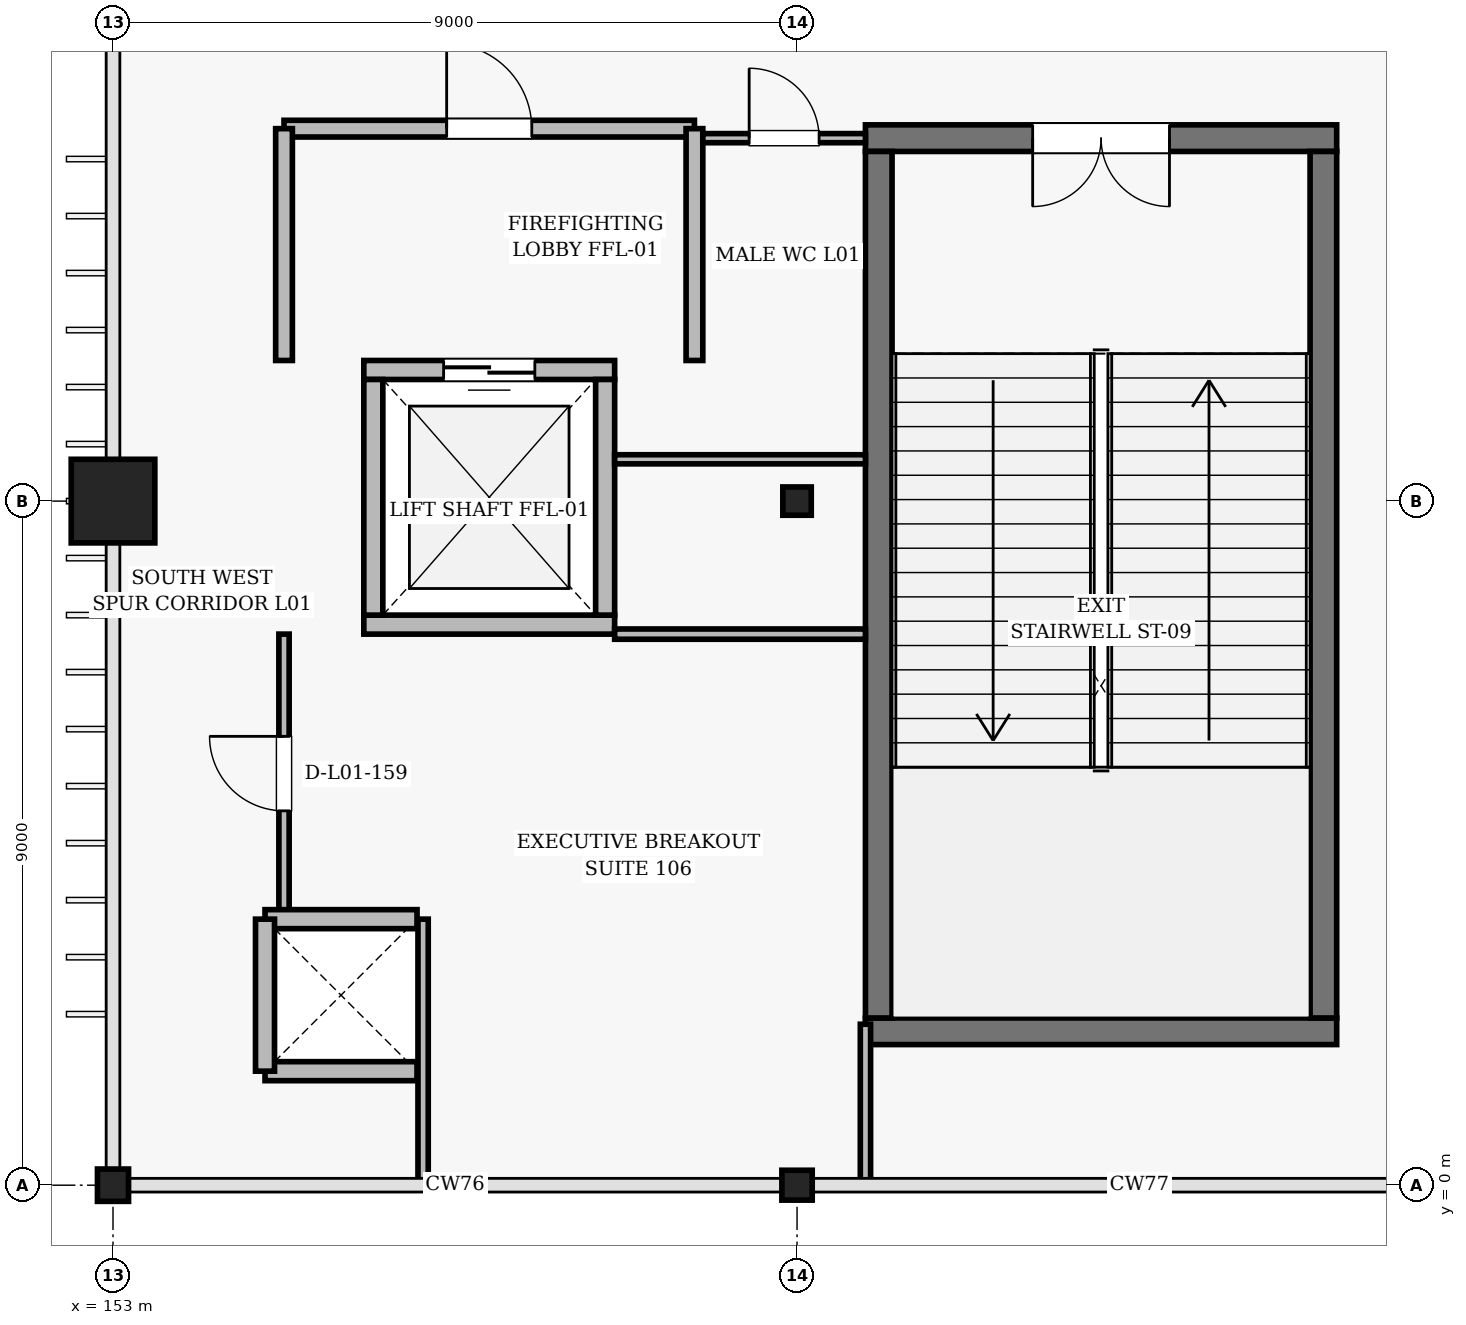
"""IFC4 building model, lengths in metres.
Left out: names, types, materials, properties, quantities, classifications, styles, units other than length and angle.
Written with IfcOpenShell. Run it as: python <this file> out.ifc"""

import sys

from ifc_helpers import new_model, si_unit, direction, frame, frame_2d, origin, origin_2d, place, context, subcontext, project, spatial, rectangle, i_section, extrude, element, fill, save


model = new_model("IFC4")
c1 = context("Model", 3, precision=1e-05, world=origin(), true_north=direction((0.0, 1.0)))
c2 = subcontext(c1, "Body", "Model", "MODEL_VIEW")
j1 = project(units=[si_unit("LENGTHUNIT", "METRE"), si_unit("PLANEANGLEUNIT", "RADIAN")], contexts=[c1])
p1 = place(None, origin())
s1 = spatial("IfcSite", under=j1, at=p1, CompositionType="ELEMENT")
p2 = place(p1, origin())
s2 = spatial("IfcBuilding", under=s1, at=p2, CompositionType="ELEMENT")
p3 = place(p2, frame((0.0, 0.0, 5.4)))
s3 = spatial("IfcBuildingStorey", under=s2, at=p3, CompositionType="ELEMENT", Elevation=5.4)
p4 = place(p3, frame((153.0, 0.0, 0.0), z_axis=(0.0, 0.0, 1.0), x_axis=(1.0, 0.0, 0.0)))
e1 = element("IfcColumn", 1, at=p4, inside=s3, PredefinedType="COLUMN", context=c2, shape_type="SweptSolid", body=[
    extrude(i_section(OverallWidth=0.409, OverallDepth=0.425, WebThickness=0.031, FlangeThickness=0.049, FilletRadius=0.02, at=origin_2d()), origin(), (0.0, 0.0, 1.0), 5.4),
])
p5 = place(p3, frame((153.0, 9.0, 0.0), z_axis=(0.0, 0.0, 1.0), x_axis=(1.0, 0.0, 0.0)))
e2 = element("IfcColumn", 2, at=p5, inside=s3, PredefinedType="COLUMN", context=c2, shape_type="SweptSolid", body=[
    extrude(rectangle(XDim=1.1, YDim=1.1, at=origin_2d()), origin(), (0.0, 0.0, 1.0), 5.4),
])
p6 = place(p3, frame((162.0, 0.0, 0.0), z_axis=(0.0, 0.0, 1.0), x_axis=(1.0, 0.0, 0.0)))
e3 = element("IfcColumn", 3, at=p6, inside=s3, PredefinedType="COLUMN", context=c2, shape_type="SweptSolid", body=[
    extrude(i_section(OverallWidth=0.399, OverallDepth=0.393, WebThickness=0.023, FlangeThickness=0.037, FilletRadius=0.018, at=origin_2d()), origin(), (0.0, 0.0, 1.0), 5.4),
])
p7 = place(p3, frame((162.0, 9.0, 0.0), z_axis=(0.0, 0.0, 1.0), x_axis=(1.0, 0.0, 0.0)))
e4 = element("IfcColumn", 4, at=p7, inside=s3, PredefinedType="COLUMN", context=c2, shape_type="SweptSolid", body=[
    extrude(i_section(OverallWidth=0.374, OverallDepth=0.372, WebThickness=0.016, FlangeThickness=0.026, FilletRadius=0.016, at=origin_2d()), origin(), (0.0, 0.0, 1.0), 5.4),
])
p8 = place(p3, frame((162.9, 2.025, 0.0), z_axis=(0.0, 0.0, 1.0), x_axis=(1.0, 0.0, 0.0)))
e5 = element("IfcWall", 5, at=p8, inside=s3, PredefinedType="SHEAR", context=c2, shape_type="SweptSolid", body=[
    extrude(rectangle(XDim=6.2, YDim=0.35, at=frame_2d((3.1, 0.0))), origin(), (0.0, 0.0, 1.0), 5.18),
])
p9 = place(p3, frame((169.1, 13.775, 0.0), z_axis=(0.0, 0.0, 1.0), x_axis=(-1.0, 0.0, 0.0)))
e6 = element("IfcWall", 6, at=p9, inside=s3, PredefinedType="SHEAR", context=c2, shape_type="SweptSolid", body=[
    extrude(rectangle(XDim=6.2, YDim=0.35, at=frame_2d((3.1, 0.0))), origin(), (0.0, 0.0, 1.0), 5.18),
])
p10 = place(p9, frame((2.2, 0.0, 0.0)))
e7 = element("IfcOpeningElement", 7, at=p10, cuts=e6, PredefinedType="OPENING", context=c2, shape_type="SweptSolid", body=[
    extrude(rectangle(XDim=1.8, YDim=2.2, at=frame_2d((0.9, 1.1))), frame((0.0, 0.185, 0.0), z_axis=(0.0, -1.0, 0.0), x_axis=(1.0, 0.0, 0.0)), (0.0, 0.0, 1.0), 0.37),
])
for number, where, z_axis, x_axis in (
    (8, (163.075, 13.6, 0.0), (0.0, 0.0, 1.0), (0.0, -1.0, 0.0)),
    (9, (168.925, 2.2, 0.0), (0.0, 0.0, 1.0), (0.0, 1.0, 0.0)),
):
    element("IfcWall", number, at=place(p3, frame(where, z_axis=z_axis, x_axis=x_axis)), inside=s3, PredefinedType="SHEAR", context=c2, shape_type="SweptSolid", body=[
        extrude(rectangle(XDim=11.4, YDim=0.35, at=frame_2d((5.7, 0.0))), origin(), (0.0, 0.0, 1.0), 5.18),
    ])
p11 = place(p3, frame((156.3, 7.375, 0.0), z_axis=(0.0, 0.0, 1.0), x_axis=(1.0, 0.0, 0.0)))
e10 = element("IfcWall", 10, at=p11, inside=s3, PredefinedType="SOLIDWALL", context=c2, shape_type="SweptSolid", body=[
    extrude(rectangle(XDim=3.3, YDim=0.25, at=frame_2d((1.65, 0.0))), origin(), (0.0, 0.0, 1.0), 5.16),
])
p12 = place(p3, frame((159.6, 10.725, 0.0), z_axis=(0.0, 0.0, 1.0), x_axis=(-1.0, 0.0, 0.0)))
e11 = element("IfcWall", 11, at=p12, inside=s3, PredefinedType="SOLIDWALL", context=c2, shape_type="SweptSolid", body=[
    extrude(rectangle(XDim=3.3, YDim=0.25, at=frame_2d((1.65, 0.0))), origin(), (0.0, 0.0, 1.0), 5.16),
])
p13 = place(p12, frame((1.05, 0.0, 0.0)))
e12 = element("IfcOpeningElement", 12, at=p13, cuts=e11, PredefinedType="OPENING", context=c2, shape_type="SweptSolid", body=[
    extrude(rectangle(XDim=1.2, YDim=2.25, at=frame_2d((0.6, 1.125))), frame((0.0, 0.135, 0.0), z_axis=(0.0, -1.0, 0.0), x_axis=(1.0, 0.0, 0.0)), (0.0, 0.0, 1.0), 0.27),
])
for number, where, z_axis, x_axis in (
    (13, (156.425, 10.6, 0.0), (0.0, 0.0, 1.0), (0.0, -1.0, 0.0)),
    (14, (159.475, 7.5, 0.0), (0.0, 0.0, 1.0), (0.0, 1.0, 0.0)),
):
    element("IfcWall", number, at=place(p3, frame(where, z_axis=z_axis, x_axis=x_axis)), inside=s3, PredefinedType="SOLIDWALL", context=c2, shape_type="SweptSolid", body=[
        extrude(rectangle(XDim=3.1, YDim=0.25, at=frame_2d((1.55, 0.0))), origin(), (0.0, 0.0, 1.0), 5.16),
    ])
p14 = place(p3, frame((155.25, 13.9, 0.0), z_axis=(0.0, 0.0, 1.0), x_axis=(1.0, 0.0, 0.0)))
e15 = element("IfcWall", 15, at=p14, inside=s3, PredefinedType="SOLIDWALL", context=c2, shape_type="SweptSolid", body=[
    extrude(rectangle(XDim=5.4, YDim=0.22, at=frame_2d((2.7, 0.0))), origin(), (0.0, 0.0, 1.0), 5.16),
])
p15 = place(p14, frame((2.14, 0.0, 0.0)))
e16 = element("IfcOpeningElement", 16, at=p15, cuts=e15, PredefinedType="OPENING", context=c2, shape_type="SweptSolid", body=[
    extrude(rectangle(XDim=1.12, YDim=2.2, at=frame_2d((0.56, 1.1))), frame((0.0, 0.12, 0.0), z_axis=(0.0, -1.0, 0.0), x_axis=(1.0, 0.0, 0.0)), (0.0, 0.0, 1.0), 0.24),
])
for number, where, z_axis, x_axis in (
    (17, (155.25, 10.85, 0.0), (0.0, 0.0, 1.0), (0.0, 1.0, 0.0)),
    (18, (160.65, 10.85, 0.0), (0.0, 0.0, 1.0), (0.0, 1.0, 0.0)),
):
    element("IfcWall", number, at=place(p3, frame(where, z_axis=z_axis, x_axis=x_axis)), inside=s3, PredefinedType="SOLIDWALL", context=c2, shape_type="SweptSolid", body=[
        extrude(rectangle(XDim=3.05, YDim=0.22, at=frame_2d((1.525, 0.0))), origin(), (0.0, 0.0, 1.0), 5.16),
    ])
p16 = place(p3, frame((160.76, 13.775, 0.0), z_axis=(0.0, 0.0, 1.0), x_axis=(1.0, 0.0, 0.0)))
e19 = element("IfcWall", 19, at=p16, inside=s3, PredefinedType="PARTITIONING", context=c2, shape_type="SweptSolid", body=[
    extrude(rectangle(XDim=2.14, YDim=0.12, at=frame_2d((1.07, 0.0))), origin(), (0.0, 0.0, 1.0), 4.47),
])
p17 = place(p16, frame((0.61, 0.0, 0.0)))
e20 = element("IfcOpeningElement", 20, at=p17, cuts=e19, PredefinedType="OPENING", context=c2, shape_type="SweptSolid", body=[
    extrude(rectangle(XDim=0.92, YDim=2.12, at=frame_2d((0.46, 1.06))), frame((0.0, 0.07, 0.0), z_axis=(0.0, -1.0, 0.0), x_axis=(1.0, 0.0, 0.0)), (0.0, 0.0, 1.0), 0.14),
])
p18 = place(p3, frame((162.9, 9.55, 0.0), z_axis=(0.0, 0.0, 1.0), x_axis=(-1.0, 0.0, 0.0)))
e21 = element("IfcWall", 21, at=p18, inside=s3, PredefinedType="PARTITIONING", context=c2, shape_type="SweptSolid", body=[
    extrude(rectangle(XDim=3.3, YDim=0.12, at=frame_2d((1.65, 0.0))), origin(), (0.0, 0.0, 1.0), 4.47),
])
p19 = place(p3, frame((159.6, 7.25, 0.0), z_axis=(0.0, 0.0, 1.0), x_axis=(1.0, 0.0, 0.0)))
e22 = element("IfcWall", 22, at=p19, inside=s3, PredefinedType="PARTITIONING", context=c2, shape_type="SweptSolid", body=[
    extrude(rectangle(XDim=3.3, YDim=0.135, at=frame_2d((1.65, 0.0))), origin(), (0.0, 0.0, 1.0), 4.392),
])
p20 = place(p3, frame((162.9, 2.117, 0.0), z_axis=(0.0, 0.0, 1.0), x_axis=(0.0, -1.0, 0.0)))
e23 = element("IfcWall", 23, at=p20, inside=s3, PredefinedType="PARTITIONING", context=c2, shape_type="SweptSolid", body=[
    extrude(rectangle(XDim=2.105, YDim=0.135, at=frame_2d((1.053, 0.0))), origin(), (0.0, 0.0, 1.0), 4.699),
])
p21 = place(p3, frame((157.08, 0.012, 0.0), z_axis=(0.0, 0.0, 1.0), x_axis=(0.0, 1.0, 0.0)))
e24 = element("IfcWall", 24, at=p21, inside=s3, PredefinedType="PARTITIONING", context=c2, shape_type="SweptSolid", body=[
    extrude(rectangle(XDim=3.488, YDim=0.135, at=frame_2d((1.744, 0.0))), origin(), (0.0, 0.0, 1.0), 4.626),
])
p22 = place(p3, frame((155.25, 3.58, 0.0), z_axis=(0.0, 0.0, 1.0), x_axis=(0.0, 1.0, 0.0)))
e25 = element("IfcWall", 25, at=p22, inside=s3, PredefinedType="PARTITIONING", context=c2, shape_type="SweptSolid", body=[
    extrude(rectangle(XDim=3.67, YDim=0.135, at=frame_2d((1.835, 0.0))), origin(), (0.0, 0.0, 1.0), 5.16),
])
p23 = place(p22, frame((1.345, 0.0, 0.0)))
e26 = element("IfcOpeningElement", 26, at=p23, cuts=e25, PredefinedType="OPENING", context=c2, shape_type="SweptSolid", body=[
    extrude(rectangle(XDim=0.98, YDim=2.15, at=frame_2d((0.49, 1.075))), frame((0.0, 0.078, 0.0), z_axis=(0.0, -1.0, 0.0), x_axis=(1.0, 0.0, 0.0)), (0.0, 0.0, 1.0), 0.155),
])
for number, where, z_axis, x_axis in (
    (27, (155.0, 1.5, 0.0), (0.0, 0.0, 1.0), (1.0, 0.0, 0.0)),
    (28, (157.0, 3.5, 0.0), (0.0, 0.0, 1.0), (-1.0, 0.0, 0.0)),
    (29, (155.0, 3.5, 0.0), (0.0, 0.0, 1.0), (0.0, -1.0, 0.0)),
):
    element("IfcWall", number, at=place(p3, frame(where, z_axis=z_axis, x_axis=x_axis)), inside=s3, PredefinedType="SOLIDWALL", context=c2, shape_type="SweptSolid", body=[
        extrude(rectangle(XDim=2.0, YDim=0.25, at=frame_2d((1.0, 0.0))), origin(), (0.0, 0.0, 1.0), 4.81),
    ])
p24 = place(p10, origin())
e30 = element("IfcDoor", 30, at=p24, inside=s3, OperationType="DOUBLE_DOOR_SINGLE_SWING", PredefinedType="DOOR", context=c2, shape_type="SweptSolid", body=[
    extrude(rectangle(XDim=1.8, YDim=2.2, at=frame_2d((0.9, 1.1))), frame((0.0, 0.025, 0.0), z_axis=(0.0, -1.0, 0.0), x_axis=(1.0, 0.0, 0.0)), (0.0, 0.0, 1.0), 0.05),
])
fill(e7, e30)
p25 = place(p13, origin())
e31 = element("IfcDoor", 31, at=p25, inside=s3, OperationType="DOUBLE_DOOR_SLIDING", PredefinedType="DOOR", context=c2, shape_type="SweptSolid", body=[
    extrude(rectangle(XDim=1.2, YDim=2.25, at=frame_2d((0.6, 1.125))), frame((0.0, 0.025, 0.0), z_axis=(0.0, -1.0, 0.0), x_axis=(1.0, 0.0, 0.0)), (0.0, 0.0, 1.0), 0.05),
])
fill(e12, e31)
p26 = place(p15, origin())
e32 = element("IfcDoor", 32, at=p26, inside=s3, OperationType="SINGLE_SWING_LEFT", PredefinedType="DOOR", context=c2, shape_type="SweptSolid", body=[
    extrude(rectangle(XDim=1.12, YDim=2.2, at=frame_2d((0.56, 1.1))), frame((0.0, 0.025, 0.0), z_axis=(0.0, -1.0, 0.0), x_axis=(1.0, 0.0, 0.0)), (0.0, 0.0, 1.0), 0.05),
])
fill(e16, e32)
p27 = place(p17, origin())
e33 = element("IfcDoor", 33, at=p27, inside=s3, OperationType="SINGLE_SWING_LEFT", PredefinedType="DOOR", context=c2, shape_type="SweptSolid", body=[
    extrude(rectangle(XDim=0.92, YDim=2.12, at=frame_2d((0.46, 1.06))), frame((0.0, 0.025, 0.0), z_axis=(0.0, -1.0, 0.0), x_axis=(1.0, 0.0, 0.0)), (0.0, 0.0, 1.0), 0.05),
])
fill(e20, e33)
p28 = place(p23, origin())
e34 = element("IfcDoor", 34, at=p28, inside=s3, OperationType="SINGLE_SWING_RIGHT", PredefinedType="DOOR", context=c2, shape_type="SweptSolid", body=[
    extrude(rectangle(XDim=0.98, YDim=2.15, at=frame_2d((0.49, 1.075))), frame((0.0, 0.025, 0.0), z_axis=(0.0, -1.0, 0.0), x_axis=(1.0, 0.0, 0.0)), (0.0, 0.0, 1.0), 0.05),
])
fill(e26, e34)
save(model, sys.argv[1])
